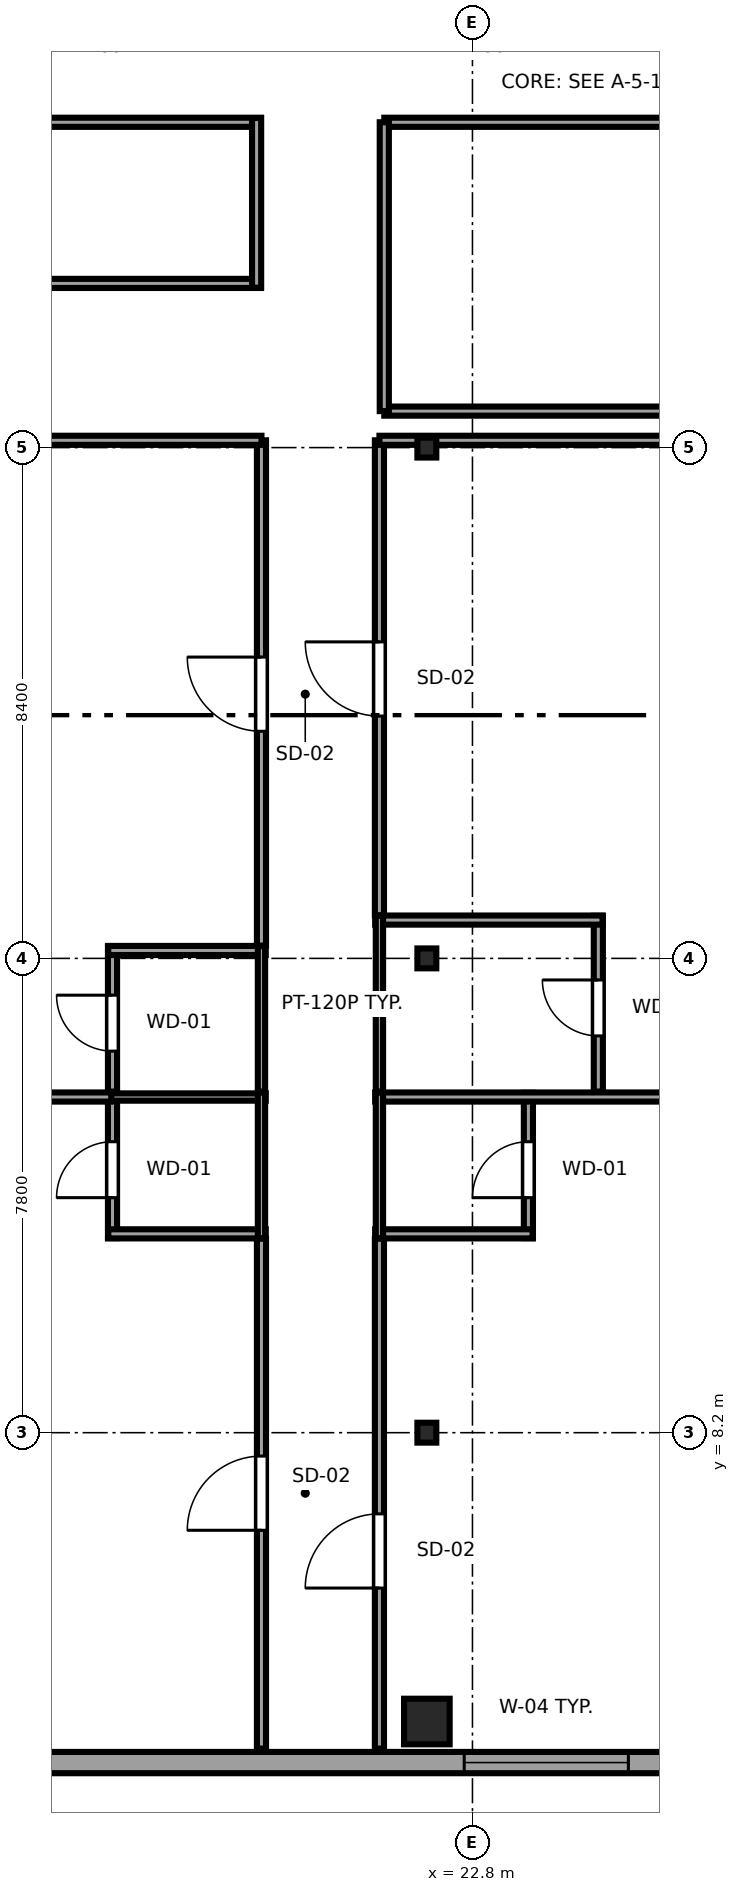
"""IFC4 building model, lengths in metres.
Left out: names, types, materials, properties, quantities, classifications, styles, units other than length and angle.
Written with IfcOpenShell. Run it as: python <this file> out.ifc"""

import sys

from ifc_helpers import new_model, si_unit, direction, frame, frame_2d, origin, origin_2d, place, context, subcontext, project, spatial, rectangle, i_section, extrude, source, transform, mapped, element, fill, save


model = new_model("IFC4")
c1 = context("Model", 3, precision=1e-05, world=origin(), true_north=direction((0.0, 1.0)))
c2 = subcontext(c1, "Body", "Model", "MODEL_VIEW")
j1 = project(units=[si_unit("LENGTHUNIT", "METRE"), si_unit("PLANEANGLEUNIT", "RADIAN")], contexts=[c1])
p1 = place(None, origin())
s1 = spatial("IfcSite", under=j1, at=p1, CompositionType="ELEMENT")
p2 = place(p1, origin())
s2 = spatial("IfcBuilding", under=s1, at=p2, CompositionType="ELEMENT")
p3 = place(p2, frame((0.0, 0.0, 220.35)))
s3 = spatial("IfcBuildingStorey", under=s2, at=p3, CompositionType="ELEMENT", Elevation=220.35)
m1 = source(origin(), c2, "Body", "SweptSolid", [
    extrude(rectangle(XDim=0.75, YDim=0.75, at=origin_2d()), origin(), (0.0, 0.0, 1.0), 3.55),
])
p4 = place(p3, frame((22.05, 3.45, 0.0), z_axis=(0.0, 0.0, 1.0), x_axis=(1.0, 0.0, 0.0)))
e1 = element("IfcColumn", 1, at=p4, inside=s3, PredefinedType="COLUMN", context=c2, shape_type="MappedRepresentation", body=[
    mapped(m1, transform((0.0, 0.0, 0.0), x_axis=(1.0, 0.0, 0.0), y_axis=(0.0, 1.0, 0.0), z_axis=(0.0, 0.0, 1.0), scale=1.0)),
])
m2 = source(origin(), c2, "Body", "SweptSolid", [
    extrude(i_section(OverallWidth=0.311, OverallDepth=0.327, WebThickness=0.016, FlangeThickness=0.025, FilletRadius=0.017, at=origin_2d()), origin(), (0.0, 0.0, 1.0), 3.55),
])
for number, where, z_axis, x_axis in (
    (2, (22.05, 8.2, 0.0), (0.0, 0.0, 1.0), (1.0, 0.0, 0.0)),
    (3, (22.05, 16.0, 0.0), (0.0, 0.0, 1.0), (1.0, 0.0, 0.0)),
    (4, (22.05, 24.4, 0.0), (0.0, 0.0, 1.0), (1.0, 0.0, 0.0)),
):
    element("IfcColumn", number, at=place(p3, frame(where, z_axis=z_axis, x_axis=x_axis)), inside=s3, PredefinedType="COLUMN", context=c2, shape_type="MappedRepresentation", body=[
        mapped(m2, transform((0.0, 0.0, 0.0), x_axis=(1.0, 0.0, 0.0), y_axis=(0.0, 1.0, 0.0), z_axis=(0.0, 0.0, 1.0), scale=1.0)),
    ])
p5 = place(p3, frame((7.017, 2.775, 0.0), z_axis=(0.0, 0.0, 1.0), x_axis=(1.0, 0.0, 0.0)))
e5 = element("IfcWall", 5, at=p5, inside=s3, PredefinedType="SOLIDWALL", context=c2, shape_type="SweptSolid", body=[
    extrude(rectangle(XDim=28.366, YDim=0.35, at=frame_2d((14.183, 0.0))), origin(), (0.0, 0.0, 1.0), 3.37),
])
p6 = place(p5, frame((1.514, 0.0, 0.68)))
e6 = element("IfcOpeningElement", 6, at=p6, cuts=e5, PredefinedType="OPENING", context=c2, shape_type="SweptSolid", body=[
    extrude(rectangle(XDim=2.7, YDim=1.95, at=frame_2d((1.35, 0.975))), frame((0.0, 0.185, 0.0), z_axis=(0.0, -1.0, 0.0), x_axis=(1.0, 0.0, 0.0)), (0.0, 0.0, 1.0), 0.37),
])
p7 = place(p5, frame((15.647, 0.0, 0.68)))
e7 = element("IfcOpeningElement", 7, at=p7, cuts=e5, PredefinedType="OPENING", context=c2, shape_type="SweptSolid", body=[
    extrude(rectangle(XDim=2.7, YDim=1.95, at=frame_2d((1.35, 0.975))), frame((0.0, 0.185, 0.0), z_axis=(0.0, -1.0, 0.0), x_axis=(1.0, 0.0, 0.0)), (0.0, 0.0, 1.0), 0.37),
])
p8 = place(p5, frame((24.152, 0.0, 0.68)))
e8 = element("IfcOpeningElement", 8, at=p8, cuts=e5, PredefinedType="OPENING", context=c2, shape_type="SweptSolid", body=[
    extrude(rectangle(XDim=2.7, YDim=1.95, at=frame_2d((1.35, 0.975))), frame((0.0, 0.185, 0.0), z_axis=(0.0, -1.0, 0.0), x_axis=(1.0, 0.0, 0.0)), (0.0, 0.0, 1.0), 0.37),
])
p9 = place(p3, frame((16.88, 11.4, 0.0), z_axis=(0.0, 0.0, 1.0), x_axis=(0.0, 1.0, 0.0)))
e9 = element("IfcWall", 9, at=p9, inside=s3, PredefinedType="PARTITIONING", context=c2, shape_type="SweptSolid", body=[
    extrude(rectangle(XDim=2.39, YDim=0.15, at=frame_2d((1.195, 0.0))), origin(), (0.0, 0.0, 1.0), 3.37),
])
p10 = place(p9, frame((0.665, 0.0, 0.0)))
e10 = element("IfcOpeningElement", 10, at=p10, cuts=e9, PredefinedType="OPENING", context=c2, shape_type="SweptSolid", body=[
    extrude(rectangle(XDim=0.92, YDim=2.01, at=frame_2d((0.46, 1.005))), frame((0.0, 0.085, 0.0), z_axis=(0.0, -1.0, 0.0), x_axis=(1.0, 0.0, 0.0)), (0.0, 0.0, 1.0), 0.17),
])
p11 = place(p3, frame((16.81, 11.47, 0.0), z_axis=(0.0, 0.0, 1.0), x_axis=(1.0, 0.0, 0.0)))
e11 = element("IfcWall", 11, at=p11, inside=s3, PredefinedType="PARTITIONING", context=c2, shape_type="SweptSolid", body=[
    extrude(rectangle(XDim=2.59, YDim=0.15, at=frame_2d((1.295, 0.0))), origin(), (0.0, 0.0, 1.0), 3.37),
])
p12 = place(p3, frame((16.81, 13.72, 0.0), z_axis=(0.0, 0.0, 1.0), x_axis=(1.0, 0.0, 0.0)))
e12 = element("IfcWall", 12, at=p12, inside=s3, PredefinedType="PLUMBINGWALL", context=c2, shape_type="SweptSolid", body=[
    extrude(rectangle(XDim=2.59, YDim=0.12, at=frame_2d((1.295, 0.0))), origin(), (0.0, 0.0, 1.0), 3.37),
])
p13 = place(p3, frame((19.33, 11.4, 0.0), z_axis=(0.0, 0.0, 1.0), x_axis=(0.0, 1.0, 0.0)))
e13 = element("IfcWall", 13, at=p13, inside=s3, PredefinedType="PLUMBINGWALL", context=c2, shape_type="SweptSolid", body=[
    extrude(rectangle(XDim=2.39, YDim=0.12, at=frame_2d((1.195, 0.0))), origin(), (0.0, 0.0, 1.0), 3.37),
])
p14 = place(p3, frame((16.88, 13.81, 0.0), z_axis=(0.0, 0.0, 1.0), x_axis=(0.0, 1.0, 0.0)))
e14 = element("IfcWall", 14, at=p14, inside=s3, PredefinedType="PARTITIONING", context=c2, shape_type="SweptSolid", body=[
    extrude(rectangle(XDim=2.39, YDim=0.15, at=frame_2d((1.195, 0.0))), origin(), (0.0, 0.0, 1.0), 3.37),
])
p15 = place(p14, frame((0.665, 0.0, 0.0)))
e15 = element("IfcOpeningElement", 15, at=p15, cuts=e14, PredefinedType="OPENING", context=c2, shape_type="SweptSolid", body=[
    extrude(rectangle(XDim=0.92, YDim=2.01, at=frame_2d((0.46, 1.005))), frame((0.0, 0.085, 0.0), z_axis=(0.0, -1.0, 0.0), x_axis=(1.0, 0.0, 0.0)), (0.0, 0.0, 1.0), 0.17),
])
p16 = place(p3, frame((16.81, 16.13, 0.0), z_axis=(0.0, 0.0, 1.0), x_axis=(1.0, 0.0, 0.0)))
e16 = element("IfcWall", 16, at=p16, inside=s3, PredefinedType="PARTITIONING", context=c2, shape_type="SweptSolid", body=[
    extrude(rectangle(XDim=2.59, YDim=0.15, at=frame_2d((1.295, 0.0))), origin(), (0.0, 0.0, 1.0), 2.758),
])
p17 = place(p3, frame((19.33, 13.81, 0.0), z_axis=(0.0, 0.0, 1.0), x_axis=(0.0, 1.0, 0.0)))
e17 = element("IfcWall", 17, at=p17, inside=s3, PredefinedType="PLUMBINGWALL", context=c2, shape_type="SweptSolid", body=[
    extrude(rectangle(XDim=2.39, YDim=0.12, at=frame_2d((1.195, 0.0))), origin(), (0.0, 0.0, 1.0), 3.37),
])
p18 = place(p3, frame((23.72, 11.4, 0.0), z_axis=(0.0, 0.0, 1.0), x_axis=(0.0, 1.0, 0.0)))
e18 = element("IfcWall", 18, at=p18, inside=s3, PredefinedType="PARTITIONING", context=c2, shape_type="SweptSolid", body=[
    extrude(rectangle(XDim=2.39, YDim=0.15, at=frame_2d((1.195, 0.0))), origin(), (0.0, 0.0, 1.0), 3.37),
])
p19 = place(p18, frame((0.665, 0.0, 0.0)))
e19 = element("IfcOpeningElement", 19, at=p19, cuts=e18, PredefinedType="OPENING", context=c2, shape_type="SweptSolid", body=[
    extrude(rectangle(XDim=0.92, YDim=2.01, at=frame_2d((0.46, 1.005))), frame((0.0, 0.085, 0.0), z_axis=(0.0, -1.0, 0.0), x_axis=(1.0, 0.0, 0.0)), (0.0, 0.0, 1.0), 0.17),
])
p20 = place(p3, frame((21.2, 11.47, 0.0), z_axis=(0.0, 0.0, 1.0), x_axis=(1.0, 0.0, 0.0)))
e20 = element("IfcWall", 20, at=p20, inside=s3, PredefinedType="PARTITIONING", context=c2, shape_type="SweptSolid", body=[
    extrude(rectangle(XDim=2.59, YDim=0.15, at=frame_2d((1.295, 0.0))), origin(), (0.0, 0.0, 1.0), 3.37),
])
p21 = place(p3, frame((21.2, 13.72, 0.0), z_axis=(0.0, 0.0, 1.0), x_axis=(1.0, 0.0, 0.0)))
e21 = element("IfcWall", 21, at=p21, inside=s3, PredefinedType="PARTITIONING", context=c2, shape_type="SweptSolid", body=[
    extrude(rectangle(XDim=18.195, YDim=0.15, at=frame_2d((9.098, 0.0))), origin(), (0.0, 0.0, 1.0), 3.37),
])
p22 = place(p3, frame((21.27, 11.4, 0.0), z_axis=(0.0, 0.0, 1.0), x_axis=(0.0, 1.0, 0.0)))
e22 = element("IfcWall", 22, at=p22, inside=s3, PredefinedType="PLUMBINGWALL", context=c2, shape_type="SweptSolid", body=[
    extrude(rectangle(XDim=2.39, YDim=0.12, at=frame_2d((1.195, 0.0))), origin(), (0.0, 0.0, 1.0), 3.37),
])
p23 = place(p3, frame((24.87, 13.81, 0.0), z_axis=(0.0, 0.0, 1.0), x_axis=(0.0, 1.0, 0.0)))
e23 = element("IfcWall", 23, at=p23, inside=s3, PredefinedType="PARTITIONING", context=c2, shape_type="SweptSolid", body=[
    extrude(rectangle(XDim=2.89, YDim=0.15, at=frame_2d((1.445, 0.0))), origin(), (0.0, 0.0, 1.0), 3.37),
])
p24 = place(p23, frame((0.915, 0.0, 0.0)))
e24 = element("IfcOpeningElement", 24, at=p24, cuts=e23, PredefinedType="OPENING", context=c2, shape_type="SweptSolid", body=[
    extrude(rectangle(XDim=0.92, YDim=2.01, at=frame_2d((0.46, 1.005))), frame((0.0, 0.085, 0.0), z_axis=(0.0, -1.0, 0.0), x_axis=(1.0, 0.0, 0.0)), (0.0, 0.0, 1.0), 0.17),
])
p25 = place(p3, frame((21.2, 16.63, 0.0), z_axis=(0.0, 0.0, 1.0), x_axis=(1.0, 0.0, 0.0)))
e25 = element("IfcWall", 25, at=p25, inside=s3, PredefinedType="PARTITIONING", context=c2, shape_type="SweptSolid", body=[
    extrude(rectangle(XDim=3.74, YDim=0.15, at=frame_2d((1.87, 0.0))), origin(), (0.0, 0.0, 1.0), 3.37),
])
p26 = place(p3, frame((21.27, 13.81, 0.0), z_axis=(0.0, 0.0, 1.0), x_axis=(0.0, 1.0, 0.0)))
e26 = element("IfcWall", 26, at=p26, inside=s3, PredefinedType="PLUMBINGWALL", context=c2, shape_type="SweptSolid", body=[
    extrude(rectangle(XDim=2.89, YDim=0.12, at=frame_2d((1.445, 0.0))), origin(), (0.0, 0.0, 1.0), 3.37),
])
p27 = place(p3, frame((19.33, 3.005, 0.0), z_axis=(0.0, 0.0, 1.0), x_axis=(0.0, 1.0, 0.0)))
e27 = element("IfcWall", 27, at=p27, inside=s3, PredefinedType="PARTITIONING", context=c2, shape_type="SweptSolid", body=[
    extrude(rectangle(XDim=8.385, YDim=0.15, at=frame_2d((4.192, 0.0))), origin(), (0.0, 0.0, 1.0), 3.37),
])
p28 = place(p27, frame((3.59, 0.0, 0.0)))
e28 = element("IfcOpeningElement", 28, at=p28, cuts=e27, PredefinedType="OPENING", context=c2, shape_type="SweptSolid", body=[
    extrude(rectangle(XDim=1.22, YDim=2.08, at=frame_2d((0.61, 1.04))), frame((0.0, 0.085, 0.0), z_axis=(0.0, -1.0, 0.0), x_axis=(1.0, 0.0, 0.0)), (0.0, 0.0, 1.0), 0.17),
])
p29 = place(p3, frame((3.005, 13.72, 0.0), z_axis=(0.0, 0.0, 1.0), x_axis=(1.0, 0.0, 0.0)))
e29 = element("IfcWall", 29, at=p29, inside=s3, PredefinedType="PARTITIONING", context=c2, shape_type="SweptSolid", body=[
    extrude(rectangle(XDim=13.855, YDim=0.15, at=frame_2d((6.928, 0.0))), origin(), (0.0, 0.0, 1.0), 3.37),
])
p30 = place(p3, frame((19.33, 16.21, 0.0), z_axis=(0.0, 0.0, 1.0), x_axis=(0.0, 1.0, 0.0)))
e30 = element("IfcWall", 30, at=p30, inside=s3, PredefinedType="PARTITIONING", context=c2, shape_type="SweptSolid", body=[
    extrude(rectangle(XDim=8.31, YDim=0.15, at=frame_2d((4.155, 0.0))), origin(), (0.0, 0.0, 1.0), 3.37),
])
p31 = place(p30, frame((3.525, 0.0, 0.0)))
e31 = element("IfcOpeningElement", 31, at=p31, cuts=e30, PredefinedType="OPENING", context=c2, shape_type="SweptSolid", body=[
    extrude(rectangle(XDim=1.22, YDim=2.08, at=frame_2d((0.61, 1.04))), frame((0.0, 0.085, 0.0), z_axis=(0.0, -1.0, 0.0), x_axis=(1.0, 0.0, 0.0)), (0.0, 0.0, 1.0), 0.17),
])
p32 = place(p3, frame((3.005, 24.52, 0.0), z_axis=(0.0, 0.0, 1.0), x_axis=(1.0, 0.0, 0.0)))
e32 = element("IfcWall", 32, at=p32, inside=s3, PredefinedType="PARTITIONING", context=c2, shape_type="SweptSolid", body=[
    extrude(rectangle(XDim=16.325, YDim=0.15, at=frame_2d((8.163, 0.0))), origin(), (0.0, 0.0, 1.0), 2.758),
])
p33 = place(p3, frame((21.27, 3.005, 0.0), z_axis=(0.0, 0.0, 1.0), x_axis=(0.0, 1.0, 0.0)))
e33 = element("IfcWall", 33, at=p33, inside=s3, PredefinedType="PARTITIONING", context=c2, shape_type="SweptSolid", body=[
    extrude(rectangle(XDim=8.385, YDim=0.15, at=frame_2d((4.192, 0.0))), origin(), (0.0, 0.0, 1.0), 3.37),
])
p34 = place(p33, frame((2.64, 0.0, 0.0)))
e34 = element("IfcOpeningElement", 34, at=p34, cuts=e33, PredefinedType="OPENING", context=c2, shape_type="SweptSolid", body=[
    extrude(rectangle(XDim=1.22, YDim=2.08, at=frame_2d((0.61, 1.04))), frame((0.0, 0.085, 0.0), z_axis=(0.0, -1.0, 0.0), x_axis=(1.0, 0.0, 0.0)), (0.0, 0.0, 1.0), 0.17),
])
p35 = place(p3, frame((21.27, 16.71, 0.0), z_axis=(0.0, 0.0, 1.0), x_axis=(0.0, 1.0, 0.0)))
e35 = element("IfcWall", 35, at=p35, inside=s3, PredefinedType="PARTITIONING", context=c2, shape_type="SweptSolid", body=[
    extrude(rectangle(XDim=7.81, YDim=0.15, at=frame_2d((3.905, 0.0))), origin(), (0.0, 0.0, 1.0), 3.37),
])
p36 = place(p35, frame((3.275, 0.0, 0.0)))
e36 = element("IfcOpeningElement", 36, at=p36, cuts=e35, PredefinedType="OPENING", context=c2, shape_type="SweptSolid", body=[
    extrude(rectangle(XDim=1.22, YDim=2.08, at=frame_2d((0.61, 1.04))), frame((0.0, 0.085, 0.0), z_axis=(0.0, -1.0, 0.0), x_axis=(1.0, 0.0, 0.0)), (0.0, 0.0, 1.0), 0.17),
])
p37 = place(p3, frame((21.27, 24.52, 0.0), z_axis=(0.0, 0.0, 1.0), x_axis=(1.0, 0.0, 0.0)))
e37 = element("IfcWall", 37, at=p37, inside=s3, PredefinedType="PARTITIONING", context=c2, shape_type="SweptSolid", body=[
    extrude(rectangle(XDim=18.125, YDim=0.15, at=frame_2d((9.062, 0.0))), origin(), (0.0, 0.0, 1.0), 2.758),
])
p38 = place(p3, frame((9.93, 27.1, 0.0), z_axis=(0.0, 0.0, 1.0), x_axis=(1.0, 0.0, 0.0)))
e38 = element("IfcWall", 38, at=p38, inside=s3, PredefinedType="PARTITIONING", context=c2, shape_type="SweptSolid", body=[
    extrude(rectangle(XDim=9.39, YDim=0.15, at=frame_2d((4.695, 0.0))), origin(), (0.0, 0.0, 1.0), 3.37),
])
p39 = place(p3, frame((9.93, 29.75, 0.0), z_axis=(0.0, 0.0, 1.0), x_axis=(1.0, 0.0, 0.0)))
e39 = element("IfcWall", 39, at=p39, inside=s3, PredefinedType="PARTITIONING", context=c2, shape_type="SweptSolid", body=[
    extrude(rectangle(XDim=9.39, YDim=0.15, at=frame_2d((4.695, 0.0))), origin(), (0.0, 0.0, 1.0), 3.37),
])
p40 = place(p39, frame((4.235, 0.0, 0.0)))
e40 = element("IfcOpeningElement", 40, at=p40, cuts=e39, PredefinedType="OPENING", context=c2, shape_type="SweptSolid", body=[
    extrude(rectangle(XDim=0.92, YDim=2.01, at=frame_2d((0.46, 1.005))), frame((0.0, 0.085, 0.0), z_axis=(0.0, -1.0, 0.0), x_axis=(1.0, 0.0, 0.0)), (0.0, 0.0, 1.0), 0.17),
])
p41 = place(p3, frame((19.25, 27.03, 0.0), z_axis=(0.0, 0.0, 1.0), x_axis=(0.0, 1.0, 0.0)))
e41 = element("IfcWall", 41, at=p41, inside=s3, PredefinedType="PARTITIONING", context=c2, shape_type="SweptSolid", body=[
    extrude(rectangle(XDim=2.79, YDim=0.15, at=frame_2d((1.395, 0.0))), origin(), (0.0, 0.0, 1.0), 3.37),
])
p42 = place(p3, frame((21.35, 25.0, 0.0), z_axis=(0.0, 0.0, 1.0), x_axis=(1.0, 0.0, 0.0)))
e42 = element("IfcWall", 42, at=p42, inside=s3, PredefinedType="PARTITIONING", context=c2, shape_type="SweptSolid", body=[
    extrude(rectangle(XDim=14.45, YDim=0.15, at=frame_2d((7.225, 0.0))), origin(), (0.0, 0.0, 1.0), 3.37),
])
p43 = place(p3, frame((21.35, 29.75, 0.0), z_axis=(0.0, 0.0, 1.0), x_axis=(1.0, 0.0, 0.0)))
e43 = element("IfcWall", 43, at=p43, inside=s3, PredefinedType="PARTITIONING", context=c2, shape_type="SweptSolid", body=[
    extrude(rectangle(XDim=14.45, YDim=0.15, at=frame_2d((7.225, 0.0))), origin(), (0.0, 0.0, 1.0), 3.37),
])
p44 = place(p43, frame((6.4, 0.0, 0.0)))
e44 = element("IfcOpeningElement", 44, at=p44, cuts=e43, PredefinedType="OPENING", context=c2, shape_type="SweptSolid", body=[
    extrude(rectangle(XDim=1.65, YDim=2.15, at=frame_2d((0.825, 1.075))), frame((0.0, 0.085, 0.0), z_axis=(0.0, -1.0, 0.0), x_axis=(1.0, 0.0, 0.0)), (0.0, 0.0, 1.0), 0.17),
])
p45 = place(p3, frame((21.35, 25.0, 0.0), z_axis=(0.0, 0.0, 1.0), x_axis=(0.0, 1.0, 0.0)))
e45 = element("IfcWall", 45, at=p45, inside=s3, PredefinedType="PARTITIONING", context=c2, shape_type="SweptSolid", body=[
    extrude(rectangle(XDim=4.75, YDim=0.15, at=frame_2d((2.375, 0.0))), origin(), (0.0, 0.0, 1.0), 3.37),
])
m3 = source(origin(), c2, "Body", "SweptSolid", [
    extrude(rectangle(XDim=2.7, YDim=1.95, at=frame_2d((1.35, 0.975))), frame((0.0, 0.09, 0.0), z_axis=(0.0, -1.0, 0.0), x_axis=(1.0, 0.0, 0.0)), (0.0, 0.0, 1.0), 0.06),
])
p46 = place(p7, origin())
e46 = element("IfcWindow", 46, at=p46, inside=s3, PartitioningType="TRIPLE_PANEL_HORIZONTAL", PredefinedType="WINDOW", context=c2, shape_type="MappedRepresentation", body=[
    mapped(m3, transform((0.0, 0.0, 0.0), x_axis=(1.0, 0.0, 0.0), y_axis=(0.0, 1.0, 0.0), z_axis=(0.0, 0.0, 1.0), scale=1.0)),
])
fill(e7, e46)
m4 = source(origin(), c2, "Body", "SweptSolid", [
    extrude(rectangle(XDim=0.92, YDim=2.01, at=frame_2d((0.46, 1.005))), frame((0.0, 0.025, 0.0), z_axis=(0.0, -1.0, 0.0), x_axis=(1.0, 0.0, 0.0)), (0.0, 0.0, 1.0), 0.05),
])
p47 = place(p10, origin())
e47 = element("IfcDoor", 47, at=p47, inside=s3, OperationType="SINGLE_SWING_LEFT", PredefinedType="DOOR", context=c2, shape_type="MappedRepresentation", body=[
    mapped(m4, transform((0.0, 0.0, 0.0), x_axis=(1.0, 0.0, 0.0), y_axis=(0.0, 1.0, 0.0), z_axis=(0.0, 0.0, 1.0), scale=1.0)),
])
fill(e10, e47)
p48 = place(p15, origin())
e48 = element("IfcDoor", 48, at=p48, inside=s3, OperationType="SINGLE_SWING_RIGHT", PredefinedType="DOOR", context=c2, shape_type="MappedRepresentation", body=[
    mapped(m4, transform((0.0, 0.0, 0.0), x_axis=(1.0, 0.0, 0.0), y_axis=(0.0, 1.0, 0.0), z_axis=(0.0, 0.0, 1.0), scale=1.0)),
])
fill(e15, e48)
p49 = place(p19, origin())
e49 = element("IfcDoor", 49, at=p49, inside=s3, OperationType="SINGLE_SWING_LEFT", PredefinedType="DOOR", context=c2, shape_type="MappedRepresentation", body=[
    mapped(m4, transform((0.0, 0.0, 0.0), x_axis=(1.0, 0.0, 0.0), y_axis=(0.0, 1.0, 0.0), z_axis=(0.0, 0.0, 1.0), scale=1.0)),
])
fill(e19, e49)
p50 = place(p24, origin())
e50 = element("IfcDoor", 50, at=p50, inside=s3, OperationType="SINGLE_SWING_RIGHT", PredefinedType="DOOR", context=c2, shape_type="MappedRepresentation", body=[
    mapped(m4, transform((0.0, 0.0, 0.0), x_axis=(1.0, 0.0, 0.0), y_axis=(0.0, 1.0, 0.0), z_axis=(0.0, 0.0, 1.0), scale=1.0)),
])
fill(e24, e50)
m5 = source(origin(), c2, "Body", "SweptSolid", [
    extrude(rectangle(XDim=1.22, YDim=2.08, at=frame_2d((0.61, 1.04))), frame((0.0, 0.025, 0.0), z_axis=(0.0, -1.0, 0.0), x_axis=(1.0, 0.0, 0.0)), (0.0, 0.0, 1.0), 0.05),
])
p51 = place(p28, origin())
e51 = element("IfcDoor", 51, at=p51, inside=s3, OperationType="SINGLE_SWING_LEFT", PredefinedType="DOOR", context=c2, shape_type="MappedRepresentation", body=[
    mapped(m5, transform((0.0, 0.0, 0.0), x_axis=(1.0, 0.0, 0.0), y_axis=(0.0, 1.0, 0.0), z_axis=(0.0, 0.0, 1.0), scale=1.0)),
])
fill(e28, e51)
p52 = place(p31, origin())
e52 = element("IfcDoor", 52, at=p52, inside=s3, OperationType="SINGLE_SWING_RIGHT", PredefinedType="DOOR", context=c2, shape_type="MappedRepresentation", body=[
    mapped(m5, transform((0.0, 0.0, 0.0), x_axis=(1.0, 0.0, 0.0), y_axis=(0.0, 1.0, 0.0), z_axis=(0.0, 0.0, 1.0), scale=1.0)),
])
fill(e31, e52)
p53 = place(p34, origin())
e53 = element("IfcDoor", 53, at=p53, inside=s3, OperationType="SINGLE_SWING_LEFT", PredefinedType="DOOR", context=c2, shape_type="MappedRepresentation", body=[
    mapped(m5, transform((0.0, 0.0, 0.0), x_axis=(1.0, 0.0, 0.0), y_axis=(0.0, 1.0, 0.0), z_axis=(0.0, 0.0, 1.0), scale=1.0)),
])
fill(e34, e53)
p54 = place(p36, origin())
e54 = element("IfcDoor", 54, at=p54, inside=s3, OperationType="SINGLE_SWING_RIGHT", PredefinedType="DOOR", context=c2, shape_type="MappedRepresentation", body=[
    mapped(m5, transform((0.0, 0.0, 0.0), x_axis=(1.0, 0.0, 0.0), y_axis=(0.0, 1.0, 0.0), z_axis=(0.0, 0.0, 1.0), scale=1.0)),
])
fill(e36, e54)
save(model, sys.argv[1])
